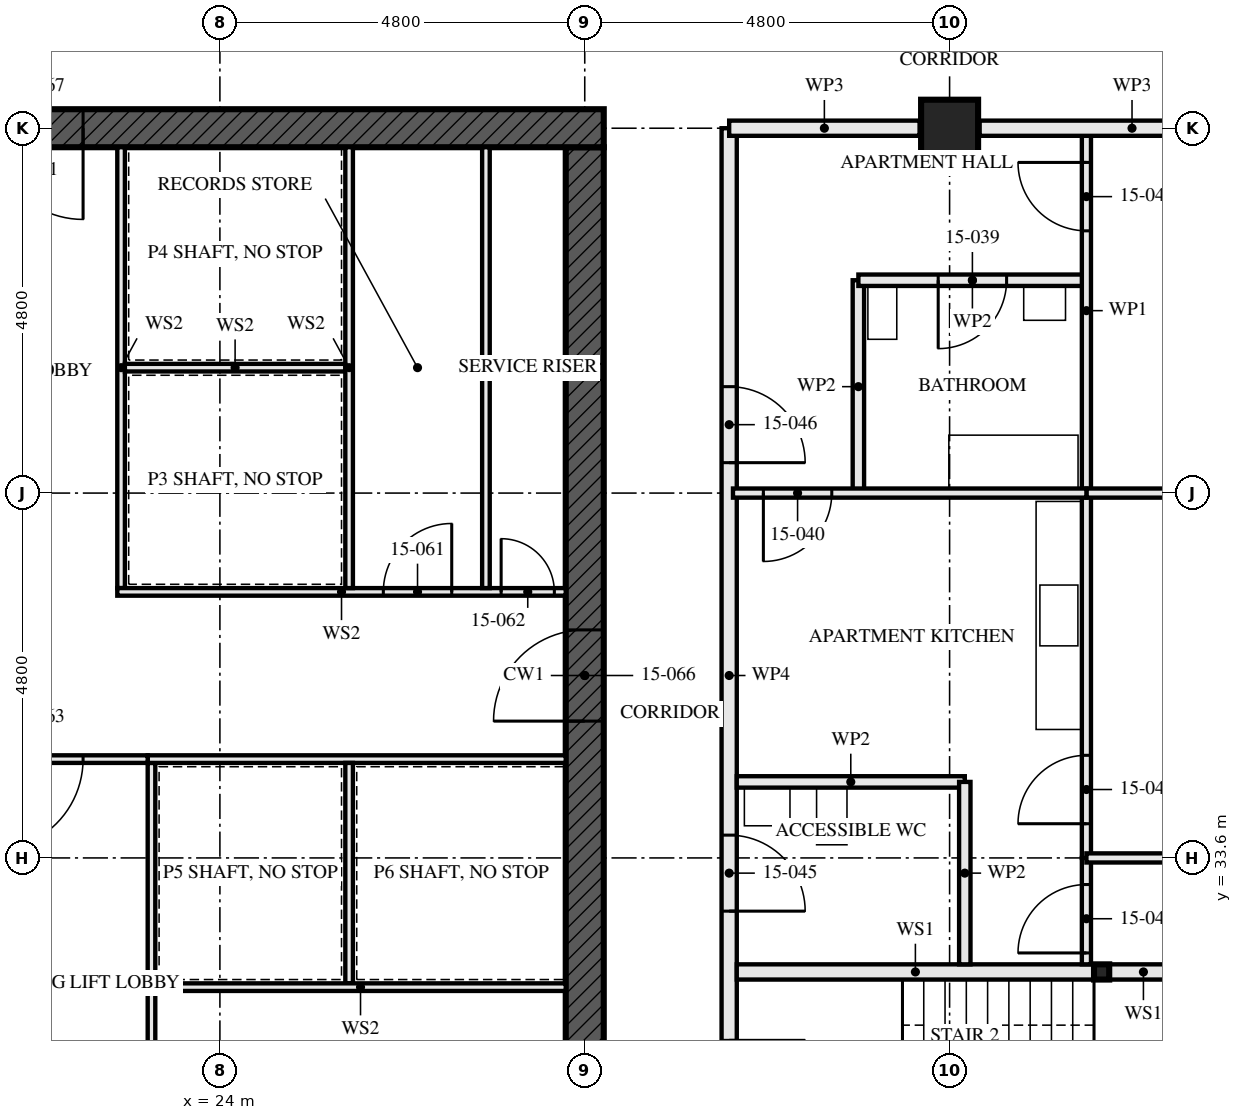
"""IFC4 building model, lengths in metres.
Left out: names, types, materials, properties, quantities, classifications, styles, units other than length and angle.
Written with IfcOpenShell. Run it as: python <this file> out.ifc"""

import sys

from ifc_helpers import new_model, si_unit, direction, frame, frame_2d, origin, origin_2d, place, context, subcontext, project, spatial, rectangle, hollow_rectangle, extrude, element, fill, save


model = new_model("IFC4")
c1 = context("Model", 3, precision=1e-05, world=origin(), true_north=direction((0.0, 1.0)))
c2 = subcontext(c1, "Body", "Model", "MODEL_VIEW")
j1 = project(units=[si_unit("LENGTHUNIT", "METRE"), si_unit("PLANEANGLEUNIT", "RADIAN")], contexts=[c1])
p1 = place(None, origin())
s1 = spatial("IfcSite", under=j1, at=p1, CompositionType="ELEMENT")
p2 = place(p1, origin())
s2 = spatial("IfcBuilding", under=s1, at=p2, CompositionType="ELEMENT")
p3 = place(p2, frame((0.0, 0.0, 58.5)))
s3 = spatial("IfcBuildingStorey", under=s2, at=p3, CompositionType="ELEMENT", Elevation=58.5)
p4 = place(p3, frame((33.6, 43.2, 0.0), z_axis=(0.0, 0.0, 1.0), x_axis=(0.0, 1.0, 0.0)))
e1 = element("IfcColumn", 1, at=p4, inside=s3, PredefinedType="COLUMN", context=c2, shape_type="SweptSolid", body=[
    extrude(hollow_rectangle(XDim=0.75, YDim=0.75, WallThickness=0.08, at=origin_2d()), origin(), (0.0, 0.0, 1.0), 3.5),
])
p5 = place(p3, frame((29.05, 43.2, -0.17), z_axis=(0.0, 0.0, 1.0), x_axis=(-1.0, 0.0, 0.0)))
e2 = element("IfcWall", 2, at=p5, inside=s3, PredefinedType="SHEAR", context=c2, shape_type="SweptSolid", body=[
    extrude(rectangle(XDim=14.9, YDim=0.5, at=frame_2d((7.45, 0.0))), origin(), (0.0, 0.0, 1.0), 3.5),
])
p6 = place(p5, frame((6.85, 0.0, 0.17)))
e3 = element("IfcOpeningElement", 3, at=p6, cuts=e2, PredefinedType="OPENING", context=c2, shape_type="SweptSolid", body=[
    extrude(rectangle(XDim=1.2, YDim=2.1, at=frame_2d((0.6, 1.05))), frame((0.0, 0.26, 0.0), z_axis=(0.0, -1.0, 0.0), x_axis=(1.0, 0.0, 0.0)), (0.0, 0.0, 1.0), 0.521),
])
p7 = place(p3, frame((28.8, 29.05, -0.17), z_axis=(0.0, 0.0, 1.0), x_axis=(0.0, 1.0, 0.0)))
e4 = element("IfcWall", 4, at=p7, inside=s3, PredefinedType="SHEAR", context=c2, shape_type="SweptSolid", body=[
    extrude(rectangle(XDim=13.9, YDim=0.5, at=frame_2d((6.95, 0.0))), origin(), (0.0, 0.0, 1.0), 3.5),
])
p8 = place(p7, frame((6.35, 0.0, 0.17)))
e5 = element("IfcOpeningElement", 5, at=p8, cuts=e4, PredefinedType="OPENING", context=c2, shape_type="SweptSolid", body=[
    extrude(rectangle(XDim=1.2, YDim=2.1, at=frame_2d((0.6, 1.05))), frame((0.0, 0.26, 0.0), z_axis=(0.0, -1.0, 0.0), x_axis=(1.0, 0.0, 0.0)), (0.0, 0.0, 1.0), 0.521),
])
p9 = place(p3, frame((35.6, 32.1, 0.0), z_axis=(0.0, 0.0, 1.0), x_axis=(1.0, 0.0, 0.0)))
e6 = element("IfcColumn", 6, at=p9, inside=s3, PredefinedType="COLUMN", context=c2, shape_type="SweptSolid", body=[
    extrude(hollow_rectangle(XDim=0.2, YDim=0.2, WallThickness=0.008, at=origin_2d()), origin(), (0.0, 0.0, 1.0), 3.33),
])
p10 = place(p3, frame((36.6, 32.1, 0.0), z_axis=(0.0, 0.0, 1.0), x_axis=(-1.0, 0.0, 0.0)))
e7 = element("IfcWall", 7, at=p10, inside=s3, PredefinedType="SOLIDWALL", context=c2, shape_type="SweptSolid", body=[
    extrude(rectangle(XDim=0.9, YDim=0.2, at=frame_2d((0.45, 0.0))), origin(), (0.0, 0.0, 1.0), 2.99),
])
p11 = place(p3, frame((35.5, 32.1, 0.0), z_axis=(0.0, 0.0, 1.0), x_axis=(-1.0, 0.0, 0.0)))
e8 = element("IfcWall", 8, at=p11, inside=s3, PredefinedType="SOLIDWALL", context=c2, shape_type="SweptSolid", body=[
    extrude(rectangle(XDim=4.7, YDim=0.2, at=frame_2d((2.35, 0.0))), origin(), (0.0, 0.0, 1.0), 2.99),
])
p12 = place(p3, frame((33.8, 32.2, 0.0), z_axis=(0.0, 0.0, 1.0), x_axis=(0.0, 1.0, 0.0)))
e9 = element("IfcWall", 9, at=p12, inside=s3, PredefinedType="PARTITIONING", context=c2, shape_type="SweptSolid", body=[
    extrude(rectangle(XDim=2.4, YDim=0.15, at=frame_2d((1.2, 0.0))), origin(), (0.0, 0.0, 1.0), 2.55),
])
p13 = place(p3, frame((33.8, 34.6, 0.0), z_axis=(0.0, 0.0, 1.0), x_axis=(-1.0, 0.0, 0.0)))
e10 = element("IfcWall", 10, at=p13, inside=s3, PredefinedType="PARTITIONING", context=c2, shape_type="SweptSolid", body=[
    extrude(rectangle(XDim=3.0, YDim=0.15, at=frame_2d((1.5, 0.0))), origin(), (0.0, 0.0, 1.0), 3.33),
])
p14 = place(p3, frame((35.4, 41.2, 0.0), z_axis=(0.0, 0.0, 1.0), x_axis=(-1.0, 0.0, 0.0)))
e11 = element("IfcWall", 11, at=p14, inside=s3, PredefinedType="PARTITIONING", context=c2, shape_type="SweptSolid", body=[
    extrude(rectangle(XDim=3.0, YDim=0.15, at=frame_2d((1.5, 0.0))), origin(), (0.0, 0.0, 1.0), 3.33),
])
p15 = place(p14, frame((1.05, 0.0, 0.0)))
e12 = element("IfcOpeningElement", 12, at=p15, cuts=e11, PredefinedType="OPENING", context=c2, shape_type="SweptSolid", body=[
    extrude(rectangle(XDim=0.9, YDim=2.1, at=frame_2d((0.45, 1.05))), frame((0.0, 0.085, 0.0), z_axis=(0.0, -1.0, 0.0), x_axis=(1.0, 0.0, 0.0)), (0.0, 0.0, 1.0), 0.171),
])
p16 = place(p3, frame((32.4, 38.4, 0.0), z_axis=(0.0, 0.0, 1.0), x_axis=(0.0, 1.0, 0.0)))
e13 = element("IfcWall", 13, at=p16, inside=s3, PredefinedType="PARTITIONING", context=c2, shape_type="SweptSolid", body=[
    extrude(rectangle(XDim=2.8, YDim=0.15, at=frame_2d((1.4, 0.0))), origin(), (0.0, 0.0, 1.0), 3.33),
])
p17 = place(p3, frame((35.4, 38.4, 0.0), z_axis=(0.0, 0.0, 1.0), x_axis=(-1.0, 0.0, 0.0)))
e14 = element("IfcWall", 14, at=p17, inside=s3, PredefinedType="PARTITIONING", context=c2, shape_type="SweptSolid", body=[
    extrude(rectangle(XDim=4.65, YDim=0.12, at=frame_2d((2.325, 0.0))), origin(), (0.0, 0.0, 1.0), 2.55),
])
p18 = place(p17, frame((3.35, 0.0, 0.0)))
e15 = element("IfcOpeningElement", 15, at=p18, cuts=e14, PredefinedType="OPENING", context=c2, shape_type="SweptSolid", body=[
    extrude(rectangle(XDim=0.9, YDim=2.1, at=frame_2d((0.45, 1.05))), frame((0.0, 0.071, 0.0), z_axis=(0.0, -1.0, 0.0), x_axis=(1.0, 0.0, 0.0)), (0.0, 0.0, 1.0), 0.141),
])
p19 = place(p3, frame((35.4, 32.2, 0.0), z_axis=(0.0, 0.0, 1.0), x_axis=(0.0, 1.0, 0.0)))
e16 = element("IfcWall", 16, at=p19, inside=s3, PredefinedType="PARTITIONING", context=c2, shape_type="SweptSolid", body=[
    extrude(rectangle(XDim=1.4, YDim=0.12, at=frame_2d((0.7, 0.0))), origin(), (0.0, 0.0, 1.0), 3.33),
])
p20 = place(p19, frame((0.15, 0.0, 0.0)))
e17 = element("IfcOpeningElement", 17, at=p20, cuts=e16, PredefinedType="OPENING", context=c2, shape_type="SweptSolid", body=[
    extrude(rectangle(XDim=0.9, YDim=2.1, at=frame_2d((0.45, 1.05))), frame((0.0, 0.071, 0.0), z_axis=(0.0, -1.0, 0.0), x_axis=(1.0, 0.0, 0.0)), (0.0, 0.0, 1.0), 0.141),
])
p21 = place(p3, frame((35.4, 33.6, 0.0), z_axis=(0.0, 0.0, 1.0), x_axis=(0.0, 1.0, 0.0)))
e18 = element("IfcWall", 18, at=p21, inside=s3, PredefinedType="PARTITIONING", context=c2, shape_type="SweptSolid", body=[
    extrude(rectangle(XDim=4.8, YDim=0.12, at=frame_2d((2.4, 0.0))), origin(), (0.0, 0.0, 1.0), 3.33),
])
p22 = place(p21, frame((0.45, 0.0, 0.0)))
e19 = element("IfcOpeningElement", 19, at=p22, cuts=e18, PredefinedType="OPENING", context=c2, shape_type="SweptSolid", body=[
    extrude(rectangle(XDim=0.9, YDim=2.1, at=frame_2d((0.45, 1.05))), frame((0.0, 0.071, 0.0), z_axis=(0.0, -1.0, 0.0), x_axis=(1.0, 0.0, 0.0)), (0.0, 0.0, 1.0), 0.141),
])
p23 = place(p3, frame((35.4, 38.4, 0.0), z_axis=(0.0, 0.0, 1.0), x_axis=(0.0, 1.0, 0.0)))
e20 = element("IfcWall", 20, at=p23, inside=s3, PredefinedType="PARTITIONING", context=c2, shape_type="SweptSolid", body=[
    extrude(rectangle(XDim=4.8, YDim=0.12, at=frame_2d((2.4, 0.0))), origin(), (0.0, 0.0, 1.0), 3.33),
])
p24 = place(p23, frame((3.45, 0.0, 0.0)))
e21 = element("IfcOpeningElement", 21, at=p24, cuts=e20, PredefinedType="OPENING", context=c2, shape_type="SweptSolid", body=[
    extrude(rectangle(XDim=0.9, YDim=2.1, at=frame_2d((0.45, 1.05))), frame((0.0, 0.071, 0.0), z_axis=(0.0, -1.0, 0.0), x_axis=(1.0, 0.0, 0.0)), (0.0, 0.0, 1.0), 0.141),
])
for number, where, z_axis, x_axis in (
    (22, (42.805, 33.6, 0.0), (0.0, 0.0, 1.0), (-1.0, 0.0, 0.0)),
    (23, (42.805, 38.4, 0.0), (0.0, 0.0, 1.0), (-1.0, 0.0, 0.0)),
):
    element("IfcWall", number, at=place(p3, frame(where, z_axis=z_axis, x_axis=x_axis)), inside=s3, PredefinedType="PARTITIONING", context=c2, shape_type="SweptSolid", body=[
        extrude(rectangle(XDim=7.405, YDim=0.12, at=frame_2d((3.703, 0.0))), origin(), (0.0, 0.0, 1.0), 2.55),
    ])
p25 = place(p3, frame((30.7, 28.8, 0.0), z_axis=(0.0, 0.0, 1.0), x_axis=(0.0, 1.0, 0.0)))
e24 = element("IfcWall", 24, at=p25, inside=s3, PredefinedType="PARTITIONING", context=c2, shape_type="SweptSolid", body=[
    extrude(rectangle(XDim=14.4, YDim=0.2, at=frame_2d((7.2, 0.0))), origin(), (0.0, 0.0, 1.0), 2.55),
])
p26 = place(p25, frame((1.4, 0.0, 0.0)))
e25 = element("IfcOpeningElement", 25, at=p26, cuts=e24, PredefinedType="OPENING", context=c2, shape_type="SweptSolid", body=[
    extrude(rectangle(XDim=1.0, YDim=2.1, at=frame_2d((0.5, 1.05))), frame((0.0, 0.111, 0.0), z_axis=(0.0, -1.0, 0.0), x_axis=(1.0, 0.0, 0.0)), (0.0, 0.0, 1.0), 0.221),
])
p27 = place(p25, frame((4.1, 0.0, 0.0)))
e26 = element("IfcOpeningElement", 26, at=p27, cuts=e24, PredefinedType="OPENING", context=c2, shape_type="SweptSolid", body=[
    extrude(rectangle(XDim=1.0, YDim=2.1, at=frame_2d((0.5, 1.05))), frame((0.0, 0.111, 0.0), z_axis=(0.0, -1.0, 0.0), x_axis=(1.0, 0.0, 0.0)), (0.0, 0.0, 1.0), 0.221),
])
p28 = place(p25, frame((10.0, 0.0, 0.0)))
e27 = element("IfcOpeningElement", 27, at=p28, cuts=e24, PredefinedType="OPENING", context=c2, shape_type="SweptSolid", body=[
    extrude(rectangle(XDim=1.0, YDim=2.1, at=frame_2d((0.5, 1.05))), frame((0.0, 0.111, 0.0), z_axis=(0.0, -1.0, 0.0), x_axis=(1.0, 0.0, 0.0)), (0.0, 0.0, 1.0), 0.221),
])
for number, where, z_axis, x_axis in (
    (28, (27.5, 37.15, 0.0), (0.0, 0.0, 1.0), (0.0, 1.0, 0.0)),
    (29, (22.7, 37.15, 0.0), (0.0, 0.0, 1.0), (0.0, 1.0, 0.0)),
):
    element("IfcWall", number, at=place(p3, frame(where, z_axis=z_axis, x_axis=x_axis)), inside=s3, PredefinedType="SOLIDWALL", context=c2, shape_type="SweptSolid", body=[
        extrude(rectangle(XDim=5.8, YDim=0.1, at=frame_2d((2.9, 0.0))), origin(), (0.0, 0.0, 1.0), 3.33),
    ])
p29 = place(p3, frame((23.1, 29.05, 0.0), z_axis=(0.0, 0.0, 1.0), x_axis=(0.0, 1.0, 0.0)))
e30 = element("IfcWall", 30, at=p29, inside=s3, PredefinedType="SOLIDWALL", context=c2, shape_type="SweptSolid", body=[
    extrude(rectangle(XDim=5.8, YDim=0.1, at=frame_2d((2.9, 0.0))), origin(), (0.0, 0.0, 1.0), 3.33),
])
p30 = place(p29, frame((1.0, 0.0, 0.0)))
e31 = element("IfcOpeningElement", 31, at=p30, cuts=e30, PredefinedType="OPENING", context=c2, shape_type="SweptSolid", body=[
    extrude(rectangle(XDim=0.7, YDim=2.1, at=frame_2d((0.35, 1.05))), frame((0.0, 0.061, 0.0), z_axis=(0.0, -1.0, 0.0), x_axis=(1.0, 0.0, 0.0)), (0.0, 0.0, 1.0), 0.121),
])
p31 = place(p3, frame((23.05, 34.9, 0.0), z_axis=(0.0, 0.0, 1.0), x_axis=(1.0, 0.0, 0.0)))
e32 = element("IfcWall", 32, at=p31, inside=s3, PredefinedType="SOLIDWALL", context=c2, shape_type="SweptSolid", body=[
    extrude(rectangle(XDim=5.5, YDim=0.1, at=frame_2d((2.75, 0.0))), origin(), (0.0, 0.0, 1.0), 3.33),
])
p32 = place(p3, frame((22.65, 37.1, 0.0), z_axis=(0.0, 0.0, 1.0), x_axis=(1.0, 0.0, 0.0)))
e33 = element("IfcWall", 33, at=p32, inside=s3, PredefinedType="SOLIDWALL", context=c2, shape_type="SweptSolid", body=[
    extrude(rectangle(XDim=5.9, YDim=0.1, at=frame_2d((2.95, 0.0))), origin(), (0.0, 0.0, 1.0), 3.33),
])
p33 = place(p32, frame((3.5, 0.0, 0.0)))
e34 = element("IfcOpeningElement", 34, at=p33, cuts=e33, PredefinedType="OPENING", context=c2, shape_type="SweptSolid", body=[
    extrude(rectangle(XDim=0.9, YDim=2.1, at=frame_2d((0.45, 1.05))), frame((0.0, 0.061, 0.0), z_axis=(0.0, -1.0, 0.0), x_axis=(1.0, 0.0, 0.0)), (0.0, 0.0, 1.0), 0.121),
])
p34 = place(p32, frame((5.05, 0.0, 0.0)))
e35 = element("IfcOpeningElement", 35, at=p34, cuts=e33, PredefinedType="OPENING", context=c2, shape_type="SweptSolid", body=[
    extrude(rectangle(XDim=0.7, YDim=2.1, at=frame_2d((0.35, 1.05))), frame((0.0, 0.061, 0.0), z_axis=(0.0, -1.0, 0.0), x_axis=(1.0, 0.0, 0.0)), (0.0, 0.0, 1.0), 0.121),
])
p35 = place(p3, frame((20.55, 34.9, 0.0), z_axis=(0.0, 0.0, 1.0), x_axis=(1.0, 0.0, 0.0)))
e36 = element("IfcWall", 36, at=p35, inside=s3, PredefinedType="SOLIDWALL", context=c2, shape_type="SweptSolid", body=[
    extrude(rectangle(XDim=2.5, YDim=0.1, at=frame_2d((1.25, 0.0))), origin(), (0.0, 0.0, 1.0), 3.33),
])
p36 = place(p35, frame((0.45, 0.0, 0.0)))
e37 = element("IfcOpeningElement", 37, at=p36, cuts=e36, PredefinedType="OPENING", context=c2, shape_type="SweptSolid", body=[
    extrude(rectangle(XDim=1.2, YDim=2.1, at=frame_2d((0.6, 1.05))), frame((0.0, 0.061, 0.0), z_axis=(0.0, -1.0, 0.0), x_axis=(1.0, 0.0, 0.0)), (0.0, 0.0, 1.0), 0.121),
])
p37 = place(p3, frame((22.75, 40.05, 0.0), z_axis=(0.0, 0.0, 1.0), x_axis=(1.0, 0.0, 0.0)))
e38 = element("IfcWall", 38, at=p37, inside=s3, PredefinedType="SOLIDWALL", context=c2, shape_type="SweptSolid", body=[
    extrude(rectangle(XDim=2.9, YDim=0.1, at=frame_2d((1.45, 0.0))), origin(), (0.0, 0.0, 1.0), 3.33),
])
p38 = place(p3, frame((25.7, 37.15, 0.0), z_axis=(0.0, 0.0, 1.0), x_axis=(0.0, 1.0, 0.0)))
e39 = element("IfcWall", 39, at=p38, inside=s3, PredefinedType="SOLIDWALL", context=c2, shape_type="SweptSolid", body=[
    extrude(rectangle(XDim=5.8, YDim=0.1, at=frame_2d((2.9, 0.0))), origin(), (0.0, 0.0, 1.0), 3.33),
])
p39 = place(p3, frame((25.7, 31.95, 0.0), z_axis=(0.0, 0.0, 1.0), x_axis=(0.0, 1.0, 0.0)))
e40 = element("IfcWall", 40, at=p39, inside=s3, PredefinedType="SOLIDWALL", context=c2, shape_type="SweptSolid", body=[
    extrude(rectangle(XDim=2.9, YDim=0.1, at=frame_2d((1.45, 0.0))), origin(), (0.0, 0.0, 1.0), 3.33),
])
p40 = place(p3, frame((23.15, 31.9, 0.0), z_axis=(0.0, 0.0, 1.0), x_axis=(1.0, 0.0, 0.0)))
e41 = element("IfcWall", 41, at=p40, inside=s3, PredefinedType="SOLIDWALL", context=c2, shape_type="SweptSolid", body=[
    extrude(rectangle(XDim=5.4, YDim=0.1, at=frame_2d((2.7, 0.0))), origin(), (0.0, 0.0, 1.0), 3.33),
])
p41 = place(p3, frame((38.005, 43.2, 0.0), z_axis=(0.0, 0.0, 1.0), x_axis=(-1.0, 0.0, 0.0)))
e42 = element("IfcWall", 42, at=p41, inside=s3, PredefinedType="PARTITIONING", context=c2, shape_type="SweptSolid", body=[
    extrude(rectangle(XDim=4.01, YDim=0.2, at=frame_2d((2.005, 0.0))), origin(), (0.0, 0.0, 1.0), 2.32),
])
p42 = place(p3, frame((33.205, 43.2, 0.0), z_axis=(0.0, 0.0, 1.0), x_axis=(-1.0, 0.0, 0.0)))
e43 = element("IfcWall", 43, at=p42, inside=s3, PredefinedType="PARTITIONING", context=c2, shape_type="SweptSolid", body=[
    extrude(rectangle(XDim=2.505, YDim=0.2, at=frame_2d((1.252, 0.0))), origin(), (0.0, 0.0, 1.0), 2.32),
])
p43 = place(p15, origin())
e44 = element("IfcDoor", 44, at=p43, inside=s3, OperationType="SINGLE_SWING_LEFT", PredefinedType="DOOR", context=c2, shape_type="SweptSolid", body=[
    extrude(rectangle(XDim=0.9, YDim=2.1, at=frame_2d((0.45, 1.05))), frame((0.0, 0.022, 0.0), z_axis=(0.0, -1.0, 0.0), x_axis=(1.0, 0.0, 0.0)), (0.0, 0.0, 1.0), 0.044),
])
fill(e12, e44)
p44 = place(p18, origin())
e45 = element("IfcDoor", 45, at=p44, inside=s3, OperationType="SINGLE_SWING_LEFT", PredefinedType="DOOR", context=c2, shape_type="SweptSolid", body=[
    extrude(rectangle(XDim=0.9, YDim=2.1, at=frame_2d((0.45, 1.05))), frame((0.0, 0.022, 0.0), z_axis=(0.0, -1.0, 0.0), x_axis=(1.0, 0.0, 0.0)), (0.0, 0.0, 1.0), 0.044),
])
fill(e15, e45)
p45 = place(p20, origin())
e46 = element("IfcDoor", 46, at=p45, inside=s3, OperationType="SINGLE_SWING_RIGHT", PredefinedType="DOOR", context=c2, shape_type="SweptSolid", body=[
    extrude(rectangle(XDim=0.9, YDim=2.1, at=frame_2d((0.45, 1.05))), frame((0.0, 0.022, 0.0), z_axis=(0.0, -1.0, 0.0), x_axis=(1.0, 0.0, 0.0)), (0.0, 0.0, 1.0), 0.044),
])
fill(e17, e46)
p46 = place(p22, origin())
e47 = element("IfcDoor", 47, at=p46, inside=s3, OperationType="SINGLE_SWING_RIGHT", PredefinedType="DOOR", context=c2, shape_type="SweptSolid", body=[
    extrude(rectangle(XDim=0.9, YDim=2.1, at=frame_2d((0.45, 1.05))), frame((0.0, 0.022, 0.0), z_axis=(0.0, -1.0, 0.0), x_axis=(1.0, 0.0, 0.0)), (0.0, 0.0, 1.0), 0.044),
])
fill(e19, e47)
p47 = place(p24, origin())
e48 = element("IfcDoor", 48, at=p47, inside=s3, OperationType="SINGLE_SWING_LEFT", PredefinedType="DOOR", context=c2, shape_type="SweptSolid", body=[
    extrude(rectangle(XDim=0.9, YDim=2.1, at=frame_2d((0.45, 1.05))), frame((0.0, 0.022, 0.0), z_axis=(0.0, -1.0, 0.0), x_axis=(1.0, 0.0, 0.0)), (0.0, 0.0, 1.0), 0.044),
])
fill(e21, e48)
p48 = place(p27, frame((1.0, 0.0, 0.0), z_axis=(0.0, 0.0, 1.0), x_axis=(-1.0, 0.0, 0.0)))
e49 = element("IfcDoor", 49, at=p48, inside=s3, OperationType="SINGLE_SWING_LEFT", PredefinedType="DOOR", context=c2, shape_type="SweptSolid", body=[
    extrude(rectangle(XDim=1.0, YDim=2.1, at=frame_2d((0.5, 1.05))), frame((0.0, 0.027, 0.0), z_axis=(0.0, -1.0, 0.0), x_axis=(1.0, 0.0, 0.0)), (0.0, 0.0, 1.0), 0.054),
])
fill(e26, e49)
p49 = place(p28, frame((1.0, 0.0, 0.0), z_axis=(0.0, 0.0, 1.0), x_axis=(-1.0, 0.0, 0.0)))
e50 = element("IfcDoor", 50, at=p49, inside=s3, OperationType="SINGLE_SWING_LEFT", PredefinedType="DOOR", context=c2, shape_type="SweptSolid", body=[
    extrude(rectangle(XDim=1.0, YDim=2.1, at=frame_2d((0.5, 1.05))), frame((0.0, 0.027, 0.0), z_axis=(0.0, -1.0, 0.0), x_axis=(1.0, 0.0, 0.0)), (0.0, 0.0, 1.0), 0.054),
])
fill(e27, e50)
p50 = place(p33, origin())
e51 = element("IfcDoor", 51, at=p50, inside=s3, OperationType="SINGLE_SWING_LEFT", PredefinedType="DOOR", context=c2, shape_type="SweptSolid", body=[
    extrude(rectangle(XDim=0.9, YDim=2.1, at=frame_2d((0.45, 1.05))), frame((0.0, 0.027, 0.0), z_axis=(0.0, -1.0, 0.0), x_axis=(1.0, 0.0, 0.0)), (0.0, 0.0, 1.0), 0.054),
])
fill(e34, e51)
p51 = place(p34, origin())
e52 = element("IfcDoor", 52, at=p51, inside=s3, OperationType="SINGLE_SWING_RIGHT", PredefinedType="DOOR", context=c2, shape_type="SweptSolid", body=[
    extrude(rectangle(XDim=0.7, YDim=2.1, at=frame_2d((0.35, 1.05))), frame((0.0, 0.027, 0.0), z_axis=(0.0, -1.0, 0.0), x_axis=(1.0, 0.0, 0.0)), (0.0, 0.0, 1.0), 0.054),
])
fill(e35, e52)
p52 = place(p36, frame((1.2, 0.0, 0.0), z_axis=(0.0, 0.0, 1.0), x_axis=(-1.0, 0.0, 0.0)))
e53 = element("IfcDoor", 53, at=p52, inside=s3, OperationType="SINGLE_SWING_LEFT", PredefinedType="DOOR", context=c2, shape_type="SweptSolid", body=[
    extrude(rectangle(XDim=1.2, YDim=2.1, at=frame_2d((0.6, 1.05))), frame((0.0, 0.027, 0.0), z_axis=(0.0, -1.0, 0.0), x_axis=(1.0, 0.0, 0.0)), (0.0, 0.0, 1.0), 0.054),
])
fill(e37, e53)
p53 = place(p8, origin())
e54 = element("IfcDoor", 54, at=p53, inside=s3, OperationType="SINGLE_SWING_LEFT", PredefinedType="DOOR", context=c2, shape_type="SweptSolid", body=[
    extrude(rectangle(XDim=1.2, YDim=2.1, at=frame_2d((0.6, 1.05))), frame((0.0, 0.027, 0.0), z_axis=(0.0, -1.0, 0.0), x_axis=(1.0, 0.0, 0.0)), (0.0, 0.0, 1.0), 0.054),
])
fill(e5, e54)
p54 = place(p6, origin())
e55 = element("IfcDoor", 55, at=p54, inside=s3, OperationType="SINGLE_SWING_LEFT", PredefinedType="DOOR", context=c2, shape_type="SweptSolid", body=[
    extrude(rectangle(XDim=1.2, YDim=2.1, at=frame_2d((0.6, 1.05))), frame((0.0, 0.027, 0.0), z_axis=(0.0, -1.0, 0.0), x_axis=(1.0, 0.0, 0.0)), (0.0, 0.0, 1.0), 0.054),
])
fill(e3, e55)
save(model, sys.argv[1])
